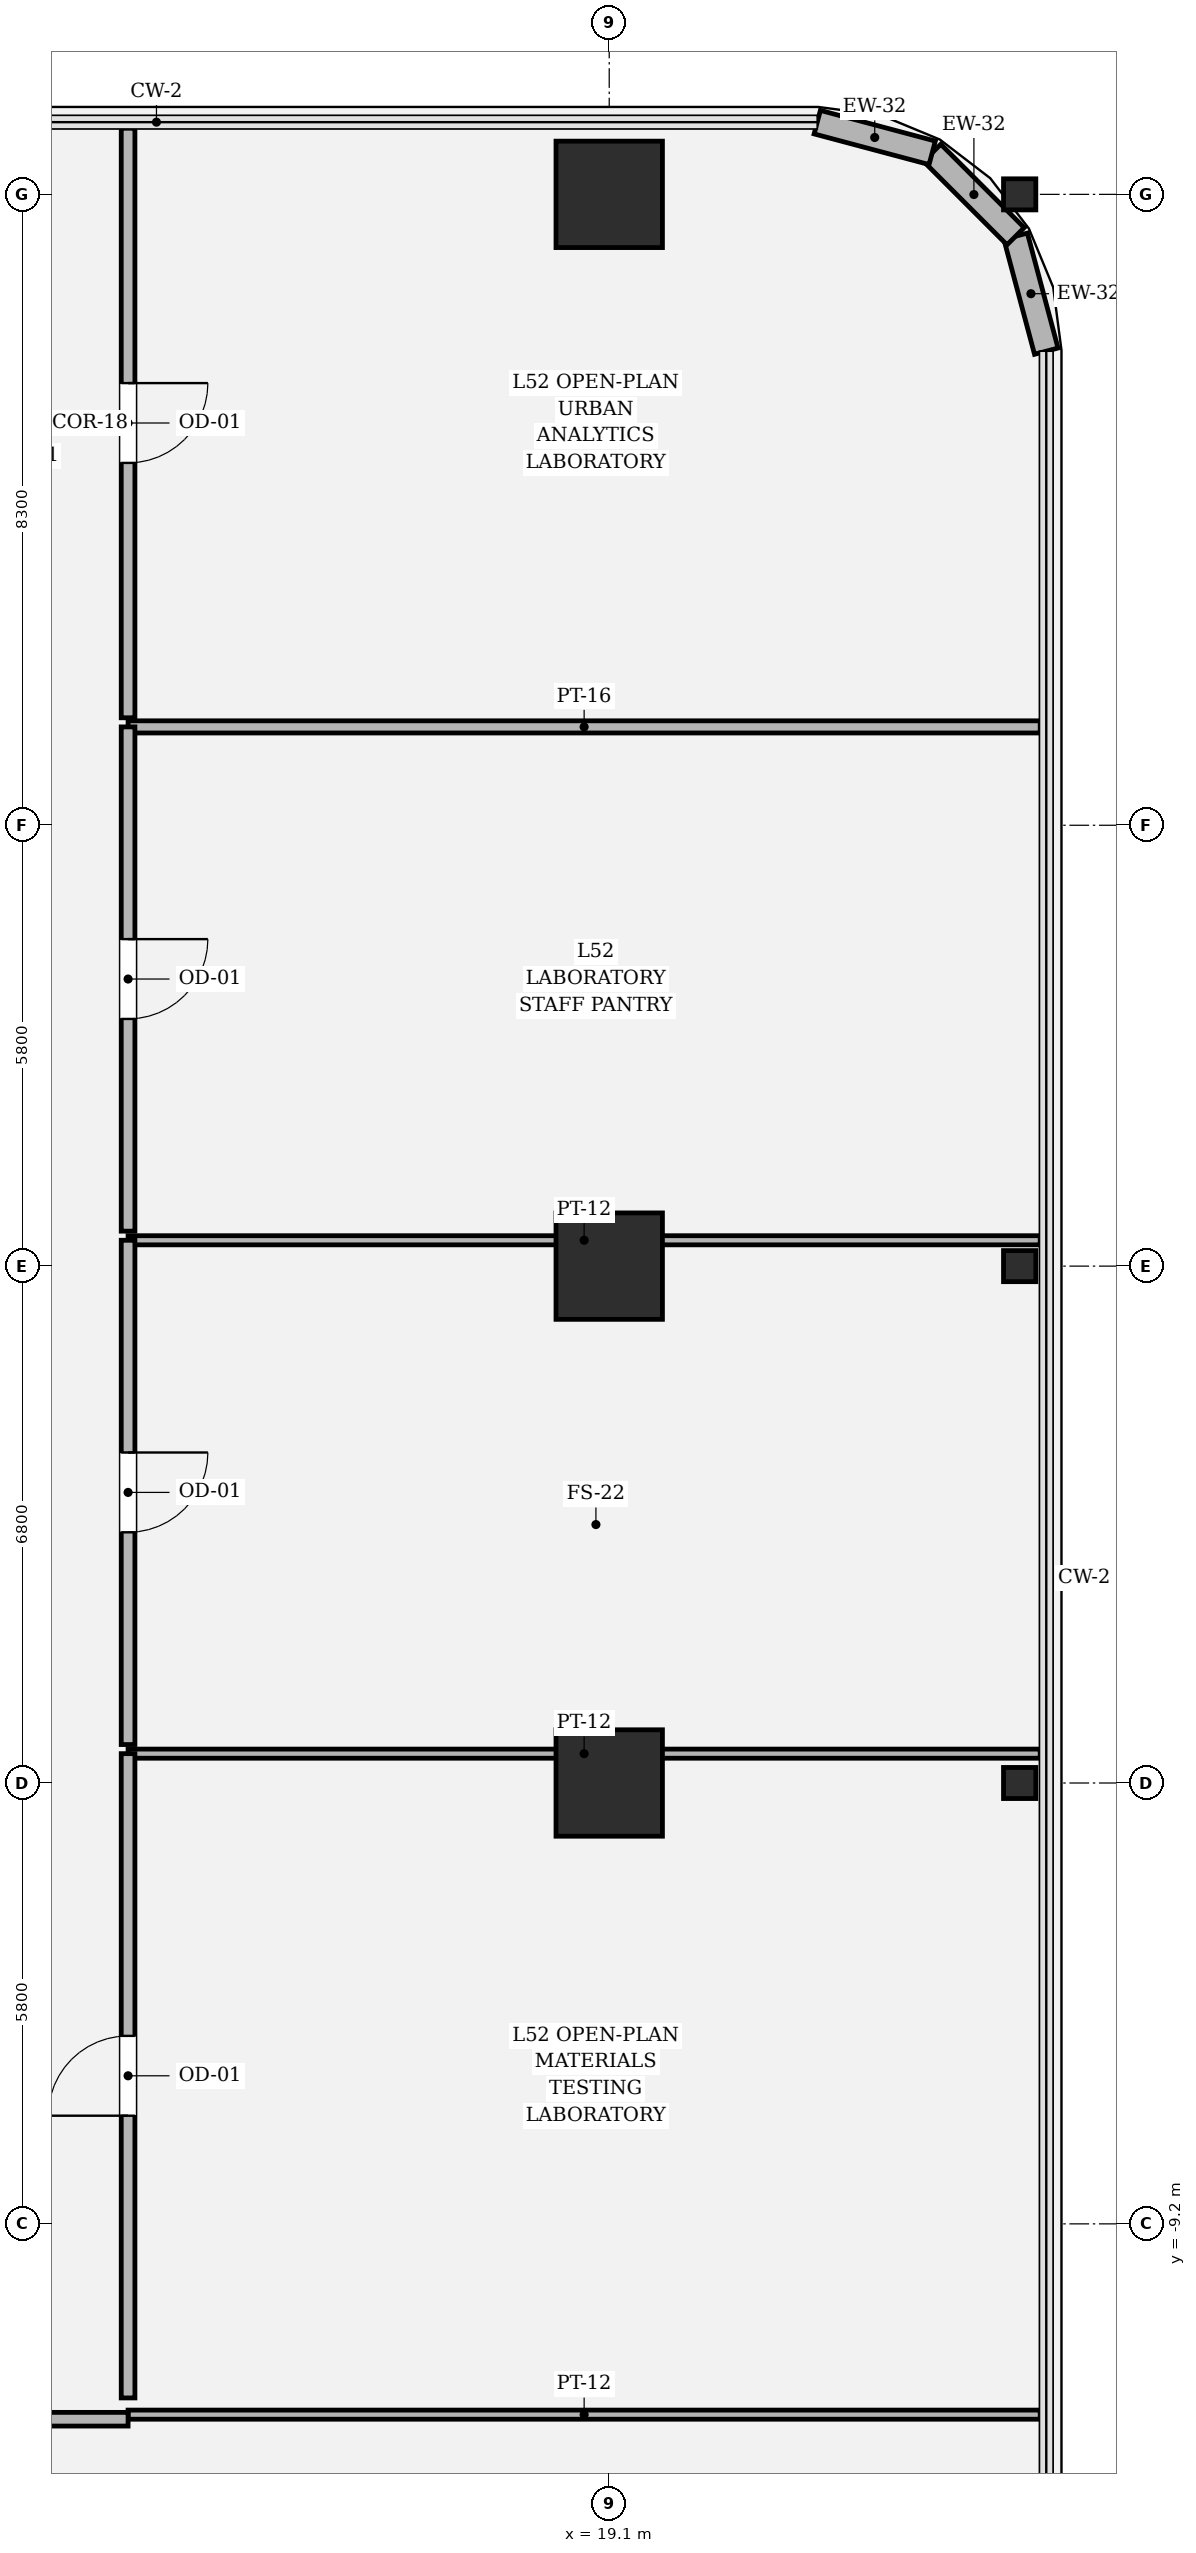
"""IFC4 building model, lengths in metres.
Left out: names, types, materials, properties, quantities, classifications, styles, units other than length and angle.
Written with IfcOpenShell. Run it as: python <this file> out.ifc"""

import sys

from ifc_helpers import new_model, si_unit, direction, frame, frame_2d, origin, origin_2d, place, context, subcontext, project, spatial, rectangle, hollow_rectangle, i_section, extrude, element, fill, save


model = new_model("IFC4")
c1 = context("Model", 3, precision=1e-05, world=origin(), true_north=direction((0.0, 1.0)))
c2 = subcontext(c1, "Body", "Model", "MODEL_VIEW")
j1 = project(units=[si_unit("LENGTHUNIT", "METRE"), si_unit("PLANEANGLEUNIT", "RADIAN")], contexts=[c1])
p1 = place(None, origin())
s1 = spatial("IfcSite", under=j1, at=p1, CompositionType="ELEMENT")
p2 = place(p1, origin())
s2 = spatial("IfcBuilding", under=s1, at=p2, CompositionType="ELEMENT")
p3 = place(p2, frame((0.0, 0.0, 220.8)))
s3 = spatial("IfcBuildingStorey", under=s2, at=p3, CompositionType="ELEMENT", Elevation=220.8)
for number, where, z_axis, x_axis in (
    (1, (19.1, -3.4, 0.0), (0.0, 0.0, 1.0), (1.0, 0.0, 0.0)),
    (2, (19.1, 3.4, 0.0), (0.0, 0.0, 1.0), (1.0, 0.0, 0.0)),
    (3, (19.1, 17.5, 0.0), (0.0, 0.0, 1.0), (1.0, 0.0, 0.0)),
):
    element("IfcColumn", number, at=place(p3, frame(where, z_axis=z_axis, x_axis=x_axis)), inside=s3, PredefinedType="COLUMN", context=c2, shape_type="SweptSolid", body=[
        extrude(hollow_rectangle(XDim=1.4, YDim=1.4, WallThickness=0.042, at=origin_2d()), origin(), (0.0, 0.0, 1.0), 4.05),
    ])
for number, where, z_axis, x_axis in (
    (4, (24.5, -3.4, 0.0), (0.0, 0.0, 1.0), (0.0, 1.0, 0.0)),
    (5, (24.5, 3.4, 0.0), (0.0, 0.0, 1.0), (0.0, 1.0, 0.0)),
    (6, (24.5, 17.5, 0.0), (0.0, 0.0, 1.0), (0.0, 1.0, 0.0)),
):
    element("IfcColumn", number, at=place(p3, frame(where, z_axis=z_axis, x_axis=x_axis)), inside=s3, PredefinedType="COLUMN", context=c2, shape_type="SweptSolid", body=[
        extrude(i_section(OverallWidth=0.409, OverallDepth=0.425, WebThickness=0.032, FlangeThickness=0.052, FilletRadius=0.018, at=origin_2d()), origin(), (0.0, 0.0, 1.0), 4.048),
    ])
p4 = place(p3, frame((24.85, 15.437, 0.0), z_axis=(0.0, 0.0, 1.0), x_axis=(-0.257847112249, 0.966185730957, 0.0)))
e7 = element("IfcWall", 7, at=p4, inside=s3, PredefinedType="SOLIDWALL", context=c2, shape_type="SweptSolid", body=[
    extrude(rectangle(XDim=1.565, YDim=0.32, at=frame_2d((0.783, 0.0))), origin(), (0.0, 0.0, 1.0), 2.544),
])
p5 = place(p3, frame((24.447, 16.949, 0.0), z_axis=(0.0, 0.0, 1.0), x_axis=(-0.707106781187, 0.707106781187, 0.0)))
e8 = element("IfcWall", 8, at=p5, inside=s3, PredefinedType="SOLIDWALL", context=c2, shape_type="SweptSolid", body=[
    extrude(rectangle(XDim=1.552, YDim=0.32, at=frame_2d((0.776, 0.0))), origin(), (0.0, 0.0, 1.0), 2.504),
])
p6 = place(p3, frame((23.349, 18.047, 0.0), z_axis=(0.0, 0.0, 1.0), x_axis=(-0.966224582397, 0.257701486942, 0.0)))
e9 = element("IfcWall", 9, at=p6, inside=s3, PredefinedType="SOLIDWALL", context=c2, shape_type="SweptSolid", body=[
    extrude(rectangle(XDim=1.565, YDim=0.32, at=frame_2d((0.783, 0.0))), origin(), (0.0, 0.0, 1.0), 3.83),
])
p7 = place(p3, frame((12.77, -11.71, 0.0), z_axis=(0.0, 0.0, 1.0), x_axis=(1.0, 0.0, 0.0)))
e10 = element("IfcWall", 10, at=p7, inside=s3, PredefinedType="PARTITIONING", context=c2, shape_type="SweptSolid", body=[
    extrude(rectangle(XDim=12.0, YDim=0.12, at=frame_2d((6.0, 0.0))), origin(), (0.0, 0.0, 1.0), 3.174),
])
p8 = place(p3, frame((2.46, -11.77, 0.0), z_axis=(0.0, 0.0, 1.0), x_axis=(1.0, 0.0, 0.0)))
e11 = element("IfcWall", 11, at=p8, inside=s3, PredefinedType="PARTITIONING", context=c2, shape_type="SweptSolid", body=[
    extrude(rectangle(XDim=10.31, YDim=0.18, at=frame_2d((5.155, 0.0))), origin(), (0.0, 0.0, 1.0), 3.174),
])
p9 = place(p8, frame((4.63, 0.0, 0.0)))
e12 = element("IfcOpeningElement", 12, at=p9, cuts=e11, PredefinedType="OPENING", context=c2, shape_type="SweptSolid", body=[
    extrude(rectangle(XDim=1.05, YDim=2.2, at=frame_2d((0.525, 1.1))), frame((0.0, 0.1, 0.0), z_axis=(0.0, -1.0, 0.0), x_axis=(1.0, 0.0, 0.0)), (0.0, 0.0, 1.0), 0.2),
])
p10 = place(p3, frame((12.77, -3.014, 0.0), z_axis=(0.0, 0.0, 1.0), x_axis=(1.0, 0.0, 0.0)))
e13 = element("IfcWall", 13, at=p10, inside=s3, PredefinedType="PARTITIONING", context=c2, shape_type="SweptSolid", body=[
    extrude(rectangle(XDim=12.0, YDim=0.12, at=frame_2d((6.0, 0.0))), origin(), (0.0, 0.0, 1.0), 2.504),
])
p11 = place(p3, frame((12.77, -11.49, 0.0), z_axis=(0.0, 0.0, 1.0), x_axis=(0.0, 1.0, 0.0)))
e14 = element("IfcWall", 14, at=p11, inside=s3, PredefinedType="PARTITIONING", context=c2, shape_type="SweptSolid", body=[
    extrude(rectangle(XDim=8.476, YDim=0.18, at=frame_2d((4.238, 0.0))), origin(), (0.0, 0.0, 1.0), 3.174),
])
p12 = place(p11, frame((3.713, 0.0, 0.0)))
e15 = element("IfcOpeningElement", 15, at=p12, cuts=e14, PredefinedType="OPENING", context=c2, shape_type="SweptSolid", body=[
    extrude(rectangle(XDim=1.05, YDim=2.2, at=frame_2d((0.525, 1.1))), frame((0.0, 0.1, 0.0), z_axis=(0.0, -1.0, 0.0), x_axis=(1.0, 0.0, 0.0)), (0.0, 0.0, 1.0), 0.2),
])
p13 = place(p3, frame((12.77, 3.74, 0.0), z_axis=(0.0, 0.0, 1.0), x_axis=(1.0, 0.0, 0.0)))
e16 = element("IfcWall", 16, at=p13, inside=s3, PredefinedType="PARTITIONING", context=c2, shape_type="SweptSolid", body=[
    extrude(rectangle(XDim=12.0, YDim=0.12, at=frame_2d((6.0, 0.0))), origin(), (0.0, 0.0, 1.0), 2.504),
])
p14 = place(p3, frame((12.77, -2.894, 0.0), z_axis=(0.0, 0.0, 1.0), x_axis=(0.0, 1.0, 0.0)))
e17 = element("IfcWall", 17, at=p14, inside=s3, PredefinedType="PARTITIONING", context=c2, shape_type="SweptSolid", body=[
    extrude(rectangle(XDim=6.634, YDim=0.18, at=frame_2d((3.317, 0.0))), origin(), (0.0, 0.0, 1.0), 3.174),
])
p15 = place(p14, frame((2.792, 0.0, 0.0)))
e18 = element("IfcOpeningElement", 18, at=p15, cuts=e17, PredefinedType="OPENING", context=c2, shape_type="SweptSolid", body=[
    extrude(rectangle(XDim=1.05, YDim=2.2, at=frame_2d((0.525, 1.1))), frame((0.0, 0.1, 0.0), z_axis=(0.0, -1.0, 0.0), x_axis=(1.0, 0.0, 0.0)), (0.0, 0.0, 1.0), 0.2),
])
p16 = place(p3, frame((12.77, 10.494, 0.0), z_axis=(0.0, 0.0, 1.0), x_axis=(1.0, 0.0, 0.0)))
e19 = element("IfcWall", 19, at=p16, inside=s3, PredefinedType="PARTITIONING", context=c2, shape_type="SweptSolid", body=[
    extrude(rectangle(XDim=12.0, YDim=0.16, at=frame_2d((6.0, 0.0))), origin(), (0.0, 0.0, 1.0), 2.544),
])
p17 = place(p3, frame((12.77, 3.86, 0.0), z_axis=(0.0, 0.0, 1.0), x_axis=(0.0, 1.0, 0.0)))
e20 = element("IfcWall", 20, at=p17, inside=s3, PredefinedType="PARTITIONING", context=c2, shape_type="SweptSolid", body=[
    extrude(rectangle(XDim=6.634, YDim=0.18, at=frame_2d((3.317, 0.0))), origin(), (0.0, 0.0, 1.0), 3.174),
])
p18 = place(p17, frame((2.792, 0.0, 0.0)))
e21 = element("IfcOpeningElement", 21, at=p18, cuts=e20, PredefinedType="OPENING", context=c2, shape_type="SweptSolid", body=[
    extrude(rectangle(XDim=1.05, YDim=2.2, at=frame_2d((0.525, 1.1))), frame((0.0, 0.1, 0.0), z_axis=(0.0, -1.0, 0.0), x_axis=(1.0, 0.0, 0.0)), (0.0, 0.0, 1.0), 0.2),
])
p19 = place(p3, frame((12.77, 10.614, 0.0), z_axis=(0.0, 0.0, 1.0), x_axis=(0.0, 1.0, 0.0)))
e22 = element("IfcWall", 22, at=p19, inside=s3, PredefinedType="PARTITIONING", context=c2, shape_type="SweptSolid", body=[
    extrude(rectangle(XDim=7.756, YDim=0.18, at=frame_2d((3.878, 0.0))), origin(), (0.0, 0.0, 1.0), 3.174),
])
p20 = place(p19, frame((3.353, 0.0, 0.0)))
e23 = element("IfcOpeningElement", 23, at=p20, cuts=e22, PredefinedType="OPENING", context=c2, shape_type="SweptSolid", body=[
    extrude(rectangle(XDim=1.05, YDim=2.2, at=frame_2d((0.525, 1.1))), frame((0.0, 0.1, 0.0), z_axis=(0.0, -1.0, 0.0), x_axis=(1.0, 0.0, 0.0)), (0.0, 0.0, 1.0), 0.2),
])
p21 = place(p12, origin())
e24 = element("IfcDoor", 24, at=p21, inside=s3, OperationType="SINGLE_SWING_LEFT", PredefinedType="DOOR", context=c2, shape_type="SweptSolid", body=[
    extrude(rectangle(XDim=1.05, YDim=2.2, at=frame_2d((0.525, 1.1))), frame((0.0, 0.025, 0.0), z_axis=(0.0, -1.0, 0.0), x_axis=(1.0, 0.0, 0.0)), (0.0, 0.0, 1.0), 0.05),
])
fill(e15, e24)
p22 = place(p15, origin())
e25 = element("IfcDoor", 25, at=p22, inside=s3, OperationType="SINGLE_SWING_RIGHT", PredefinedType="DOOR", context=c2, shape_type="SweptSolid", body=[
    extrude(rectangle(XDim=1.05, YDim=2.2, at=frame_2d((0.525, 1.1))), frame((0.0, 0.025, 0.0), z_axis=(0.0, -1.0, 0.0), x_axis=(1.0, 0.0, 0.0)), (0.0, 0.0, 1.0), 0.05),
])
fill(e18, e25)
p23 = place(p18, origin())
e26 = element("IfcDoor", 26, at=p23, inside=s3, OperationType="SINGLE_SWING_RIGHT", PredefinedType="DOOR", context=c2, shape_type="SweptSolid", body=[
    extrude(rectangle(XDim=1.05, YDim=2.2, at=frame_2d((0.525, 1.1))), frame((0.0, 0.025, 0.0), z_axis=(0.0, -1.0, 0.0), x_axis=(1.0, 0.0, 0.0)), (0.0, 0.0, 1.0), 0.05),
])
fill(e21, e26)
p24 = place(p20, origin())
e27 = element("IfcDoor", 27, at=p24, inside=s3, OperationType="SINGLE_SWING_RIGHT", PredefinedType="DOOR", context=c2, shape_type="SweptSolid", body=[
    extrude(rectangle(XDim=1.05, YDim=2.2, at=frame_2d((0.525, 1.1))), frame((0.0, 0.025, 0.0), z_axis=(0.0, -1.0, 0.0), x_axis=(1.0, 0.0, 0.0)), (0.0, 0.0, 1.0), 0.05),
])
fill(e23, e27)
save(model, sys.argv[1])
